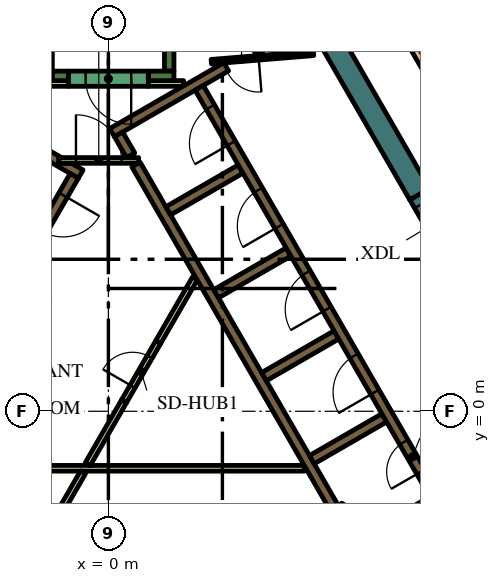
"""IFC4 building model, lengths in metres.
Left out: names, types, materials, properties, quantities, classifications, styles, units other than length and angle.
Written with IfcOpenShell. Run it as: python <this file> out.ifc"""

import sys

from ifc_helpers import new_model, si_unit, direction, frame, frame_2d, origin, place, context, subcontext, project, spatial, polyline, rectangle, outline, extrude, element, fill, save


model = new_model("IFC4")
c1 = context("Model", 3, precision=1e-05, world=origin(), true_north=direction((0.0, 1.0)))
c2 = subcontext(c1, "Body", "Model", "MODEL_VIEW")
j1 = project(units=[si_unit("LENGTHUNIT", "METRE"), si_unit("PLANEANGLEUNIT", "RADIAN")], contexts=[c1])
p1 = place(None, origin())
s1 = spatial("IfcSite", under=j1, at=p1, CompositionType="ELEMENT")
p2 = place(p1, origin())
s2 = spatial("IfcBuilding", under=s1, at=p2, CompositionType="ELEMENT")
p3 = place(p2, frame((0.0, 0.0, 331.8)))
s3 = spatial("IfcBuildingStorey", under=s2, at=p3, CompositionType="ELEMENT", Elevation=331.8)
p4 = place(p3, frame((1.989, 16.456, 0.0), z_axis=(0.0, 0.0, 1.0), x_axis=(0.49999102663, -0.8660305845, 0.0)))
e1 = element("IfcWall", 1, at=p4, inside=s3, PredefinedType="SOLIDWALL", context=c2, shape_type="SweptSolid", body=[
    extrude(rectangle(XDim=12.406, YDim=0.6, at=frame_2d((6.203, 0.0))), origin(), (0.0, 0.0, 1.0), 4.2),
])
p5 = place(p3, frame((1.6, 8.95, 0.0), z_axis=(0.0, 0.0, 1.0), x_axis=(0.0, 1.0, 0.0)))
e2 = element("IfcWall", 2, at=p5, inside=s3, PredefinedType="SOLIDWALL", context=c2, shape_type="SweptSolid", body=[
    extrude(rectangle(XDim=6.8, YDim=0.25, at=frame_2d((3.4, 0.0))), origin(), (0.0, 0.0, 1.0), 4.2),
])
p6 = place(p3, frame((1.05, 8.825, 0.0), z_axis=(0.0, 0.0, 1.0), x_axis=(1.0, 0.0, 0.0)))
e3 = element("IfcWall", 3, at=p6, inside=s3, PredefinedType="SOLIDWALL", context=c2, shape_type="SweptSolid", body=[
    extrude(rectangle(XDim=0.675, YDim=0.25, at=frame_2d((0.337, 0.0))), origin(), (0.0, 0.0, 1.0), 4.2),
])
p7 = place(p3, frame((-1.6, 8.7, 0.0), z_axis=(0.0, 0.0, 1.0), x_axis=(0.0, 1.0, 0.0)))
e4 = element("IfcWall", 4, at=p7, inside=s3, PredefinedType="SOLIDWALL", context=c2, shape_type="SweptSolid", body=[
    extrude(rectangle(XDim=7.05, YDim=0.25, at=frame_2d((3.525, 0.0))), origin(), (0.0, 0.0, 1.0), 4.2),
])
p8 = place(p3, frame((-1.475, 8.825, 0.0), z_axis=(0.0, 0.0, 1.0), x_axis=(1.0, 0.0, 0.0)))
e5 = element("IfcWall", 5, at=p8, inside=s3, PredefinedType="SOLIDWALL", context=c2, shape_type="SweptSolid", body=[
    extrude(rectangle(XDim=0.425, YDim=0.25, at=frame_2d((0.212, 0.0))), origin(), (0.0, 0.0, 1.0), 4.2),
])
p9 = place(p3, frame((8.61, -2.303, 0.0), z_axis=(0.0, 0.0, 1.0), x_axis=(-0.866056864386, -0.49994550468, 0.0)))
e6 = element("IfcWall", 6, at=p9, inside=s3, PredefinedType="SOLIDWALL", context=c2, shape_type="SweptSolid", body=[
    extrude(rectangle(XDim=2.621, YDim=0.25, at=frame_2d((1.311, 0.0))), origin(), (0.0, 0.0, 1.0), 4.2),
])
p10 = place(p3, frame((3.1, 9.064, 0.0), z_axis=(0.0, 0.0, 1.0), x_axis=(-0.866033137035, -0.499986605379, 0.0)))
e7 = element("IfcWall", 7, at=p10, inside=s3, PredefinedType="SOLIDWALL", context=c2, shape_type="SweptSolid", body=[
    extrude(rectangle(XDim=3.467, YDim=0.25, at=frame_2d((1.733, 0.0))), origin(), (0.0, 0.0, 1.0), 4.2),
])
p11 = place(p3, frame((0.268, 7.285, 0.0), z_axis=(0.0, 0.0, 1.0), x_axis=(0.500098681536, -0.865968422476, 0.0)))
e8 = element("IfcWall", 8, at=p11, inside=s3, PredefinedType="SOLIDWALL", context=c2, shape_type="SweptSolid", body=[
    extrude(rectangle(XDim=0.636, YDim=0.25, at=frame_2d((0.318, 0.0))), origin(), (0.0, 0.0, 1.0), 4.2),
])
p12 = place(p3, frame((5.97, -2.591, 0.0), z_axis=(0.0, 0.0, 1.0), x_axis=(-0.499994469932, 0.866028596547, 0.0)))
e9 = element("IfcWall", 9, at=p12, inside=s3, PredefinedType="SOLIDWALL", context=c2, shape_type="SweptSolid", body=[
    extrude(rectangle(XDim=10.488, YDim=0.25, at=frame_2d((5.244, 0.0))), origin(), (0.0, 0.0, 1.0), 4.2),
])
p13 = place(p3, frame((1.574, 5.274, 0.0), z_axis=(0.0, 0.0, 1.0), x_axis=(0.866028486751, 0.499994660107, 0.0)))
e10 = element("IfcWall", 10, at=p13, inside=s3, PredefinedType="SOLIDWALL", context=c2, shape_type="SweptSolid", body=[
    extrude(rectangle(XDim=2.2, YDim=0.25, at=frame_2d((1.1, 0.0))), origin(), (0.0, 0.0, 1.0), 4.2),
])
for number, where, z_axis, x_axis in (
    (11, (2.834, 3.091, 0.0), (0.0, 0.0, 1.0), (0.866, 0.5, 0.0)),
    (12, (4.094, 0.909, 0.0), (0.0, 0.0, 1.0), (0.866, 0.5, 0.0)),
    (13, (5.354, -1.274, 0.0), (0.0, 0.0, 1.0), (0.866, 0.5, 0.0)),
):
    element("IfcWall", number, at=place(p3, frame(where, z_axis=z_axis, x_axis=x_axis)), inside=s3, PredefinedType="SOLIDWALL", context=c2, shape_type="SweptSolid", body=[
        extrude(rectangle(XDim=2.2, YDim=0.25, at=frame_2d((1.1, 0.0))), origin(), (0.0, 0.0, 1.0), 4.2),
    ])
p14 = place(p3, frame((3.83, 9.486, 0.0), z_axis=(0.0, 0.0, 1.0), x_axis=(0.865986202621, 0.500067892261, 0.0)))
e14 = element("IfcWall", 14, at=p14, inside=s3, PredefinedType="SOLIDWALL", context=c2, shape_type="SweptSolid", body=[
    extrude(rectangle(XDim=1.591, YDim=0.25, at=frame_2d((0.795, 0.0))), origin(), (0.0, 0.0, 1.0), 4.2),
])
p15 = place(p3, origin())
e15 = element("IfcWall", 15, at=p15, inside=s3, PredefinedType="SOLIDWALL", context=c2, shape_type="SweptSolid", body=[
    extrude(outline(polyline([(-2.912, 7.356), (-2.787, 7.573), (-1.232, 6.675), (-1.303, 6.675), (-1.304, 6.675), (-1.304, 6.675), (-1.304, 6.525), (-1.304, 6.525), (-1.303, 6.525), (-0.971, 6.525), (-0.665, 6.348), (-0.79, 6.132), (-1.007, 6.257), (-1.007, 6.257), (-2.912, 7.356)])), origin(), (0.0, 0.0, 1.0), 4.2),
])
p16 = place(p3, frame((1.05, 8.625, 0.0), z_axis=(0.0, 0.0, 1.0), x_axis=(1.0, 0.0, 0.0)))
e16 = element("IfcWall", 16, at=p16, inside=s3, PredefinedType="PARTITIONING", context=c2, shape_type="SweptSolid", body=[
    extrude(rectangle(XDim=0.929, YDim=0.15, at=frame_2d((0.464, 0.0))), origin(), (0.0, 0.0, 1.0), 3.45),
])
p17 = place(p3, frame((-1.564, 8.625, 0.0), z_axis=(0.0, 0.0, 1.0), x_axis=(1.0, 0.0, 0.0)))
e17 = element("IfcWall", 17, at=p17, inside=s3, PredefinedType="PARTITIONING", context=c2, shape_type="SweptSolid", body=[
    extrude(rectangle(XDim=0.514, YDim=0.15, at=frame_2d((0.257, 0.0))), origin(), (0.0, 0.0, 1.0), 3.45),
])
p18 = place(p3, frame((-4.2, -1.5, 0.0), z_axis=(0.0, 0.0, 1.0), x_axis=(1.0, 0.0, 0.0)))
e18 = element("IfcWall", 18, at=p18, inside=s3, PredefinedType="PARTITIONING", context=c2, shape_type="SweptSolid", body=[
    extrude(rectangle(XDim=9.359, YDim=0.15, at=frame_2d((4.68, 0.0))), origin(), (0.0, 0.0, 1.0), 3.45),
])
p19 = place(p3, frame((-0.544, -1.393, 0.0), z_axis=(0.0, 0.0, 1.0), x_axis=(0.499928740635, 0.866066541489, 0.0)))
e19 = element("IfcWall", 19, at=p19, inside=s3, PredefinedType="PARTITIONING", context=c2, shape_type="SweptSolid", body=[
    extrude(rectangle(XDim=1.912, YDim=0.15, at=frame_2d((0.956, 0.0))), origin(), (0.0, 0.0, 1.0), 3.45),
])
p20 = place(p3, frame((-0.668, -1.607, 0.0), z_axis=(0.0, 0.0, 1.0), x_axis=(-0.50003736129, -0.866003832159, 0.0)))
e20 = element("IfcWall", 20, at=p20, inside=s3, PredefinedType="PARTITIONING", context=c2, shape_type="SweptSolid", body=[
    extrude(rectangle(XDim=2.438, YDim=0.15, at=frame_2d((1.219, 0.0))), origin(), (0.0, 0.0, 1.0), 3.45),
])
p21 = place(p3, frame((1.312, 1.822, 0.0), z_axis=(0.0, 0.0, 1.0), x_axis=(0.500003549559, 0.866023354436, 0.0)))
e21 = element("IfcWall", 21, at=p21, inside=s3, PredefinedType="PARTITIONING", context=c2, shape_type="SweptSolid", body=[
    extrude(rectangle(XDim=1.93, YDim=0.15, at=frame_2d((0.965, 0.0))), origin(), (0.0, 0.0, 1.0), 3.45),
])
p22 = place(p3, frame((8.565, -2.185, 0.0), z_axis=(0.0, 0.0, 1.0), x_axis=(-0.499997954832, 0.866026584559, 0.0)))
e22 = element("IfcWall", 22, at=p22, inside=s3, PredefinedType="SOLIDWALL", context=c2, shape_type="SweptSolid", body=[
    extrude(rectangle(XDim=12.35, YDim=0.25, at=frame_2d((6.175, 0.0))), origin(), (0.0, 0.0, 1.0), 4.2),
])
p23 = place(p22, frame((0.685, 0.0, 0.0)))
e23 = element("IfcOpeningElement", 23, at=p23, cuts=e22, PredefinedType="OPENING", context=c2, shape_type="SweptSolid", body=[
    extrude(rectangle(XDim=0.9, YDim=2.1, at=frame_2d((0.45, 1.05))), frame((0.0, 0.135, 0.0), z_axis=(0.0, -1.0, 0.0), x_axis=(1.0, 0.0, 0.0)), (0.0, 0.0, 1.0), 0.27),
])
p24 = place(p22, frame((3.105, 0.0, 0.0)))
e24 = element("IfcOpeningElement", 24, at=p24, cuts=e22, PredefinedType="OPENING", context=c2, shape_type="SweptSolid", body=[
    extrude(rectangle(XDim=1.1, YDim=2.1, at=frame_2d((0.55, 1.05))), frame((0.0, 0.135, 0.0), z_axis=(0.0, -1.0, 0.0), x_axis=(1.0, 0.0, 0.0)), (0.0, 0.0, 1.0), 0.27),
])
p25 = place(p22, frame((5.625, 0.0, 0.0)))
e25 = element("IfcOpeningElement", 25, at=p25, cuts=e22, PredefinedType="OPENING", context=c2, shape_type="SweptSolid", body=[
    extrude(rectangle(XDim=1.1, YDim=2.1, at=frame_2d((0.55, 1.05))), frame((0.0, 0.135, 0.0), z_axis=(0.0, -1.0, 0.0), x_axis=(1.0, 0.0, 0.0)), (0.0, 0.0, 1.0), 0.27),
])
p26 = place(p22, frame((8.145, 0.0, 0.0)))
e26 = element("IfcOpeningElement", 26, at=p26, cuts=e22, PredefinedType="OPENING", context=c2, shape_type="SweptSolid", body=[
    extrude(rectangle(XDim=1.1, YDim=2.1, at=frame_2d((0.55, 1.05))), frame((0.0, 0.135, 0.0), z_axis=(0.0, -1.0, 0.0), x_axis=(1.0, 0.0, 0.0)), (0.0, 0.0, 1.0), 0.27),
])
p27 = place(p22, frame((10.665, 0.0, 0.0)))
e27 = element("IfcOpeningElement", 27, at=p27, cuts=e22, PredefinedType="OPENING", context=c2, shape_type="SweptSolid", body=[
    extrude(rectangle(XDim=1.1, YDim=2.1, at=frame_2d((0.55, 1.05))), frame((0.0, 0.135, 0.0), z_axis=(0.0, -1.0, 0.0), x_axis=(1.0, 0.0, 0.0)), (0.0, 0.0, 1.0), 0.27),
])
p28 = place(p3, frame((-0.898, 6.194, 0.0), z_axis=(0.0, 0.0, 1.0), x_axis=(-0.499996202215, -0.866027596426, 0.0)))
e28 = element("IfcWall", 28, at=p28, inside=s3, PredefinedType="SOLIDWALL", context=c2, shape_type="SweptSolid", body=[
    extrude(rectangle(XDim=9.83, YDim=0.25, at=frame_2d((4.915, 0.0))), origin(), (0.0, 0.0, 1.0), 4.2),
])
p29 = place(p28, frame((0.585, 0.0, 0.0)))
e29 = element("IfcOpeningElement", 29, at=p29, cuts=e28, PredefinedType="OPENING", context=c2, shape_type="SweptSolid", body=[
    extrude(rectangle(XDim=1.1, YDim=2.1, at=frame_2d((0.55, 1.05))), frame((0.0, 0.135, 0.0), z_axis=(0.0, -1.0, 0.0), x_axis=(1.0, 0.0, 0.0)), (0.0, 0.0, 1.0), 0.27),
])
p30 = place(p28, frame((3.105, 0.0, 0.0)))
e30 = element("IfcOpeningElement", 30, at=p30, cuts=e28, PredefinedType="OPENING", context=c2, shape_type="SweptSolid", body=[
    extrude(rectangle(XDim=1.1, YDim=2.1, at=frame_2d((0.55, 1.05))), frame((0.0, 0.135, 0.0), z_axis=(0.0, -1.0, 0.0), x_axis=(1.0, 0.0, 0.0)), (0.0, 0.0, 1.0), 0.27),
])
p31 = place(p28, frame((5.625, 0.0, 0.0)))
e31 = element("IfcOpeningElement", 31, at=p31, cuts=e28, PredefinedType="OPENING", context=c2, shape_type="SweptSolid", body=[
    extrude(rectangle(XDim=1.1, YDim=2.1, at=frame_2d((0.55, 1.05))), frame((0.0, 0.135, 0.0), z_axis=(0.0, -1.0, 0.0), x_axis=(1.0, 0.0, 0.0)), (0.0, 0.0, 1.0), 0.27),
])
p32 = place(p28, frame((8.145, 0.0, 0.0)))
e32 = element("IfcOpeningElement", 32, at=p32, cuts=e28, PredefinedType="OPENING", context=c2, shape_type="SweptSolid", body=[
    extrude(rectangle(XDim=1.1, YDim=2.1, at=frame_2d((0.55, 1.05))), frame((0.0, 0.135, 0.0), z_axis=(0.0, -1.0, 0.0), x_axis=(1.0, 0.0, 0.0)), (0.0, 0.0, 1.0), 0.27),
])
p33 = place(p3, frame((1.05, 8.75, 0.0), z_axis=(0.0, 0.0, 1.0), x_axis=(-1.0, 0.0, 0.0)))
e33 = element("IfcWall", 33, at=p33, inside=s3, PredefinedType="SOLIDWALL", context=c2, shape_type="SweptSolid", body=[
    extrude(rectangle(XDim=2.1, YDim=0.4, at=frame_2d((1.05, 0.0))), origin(), (0.0, 0.0, 1.0), 4.2),
])
p34 = place(p33, frame((0.45, 0.0, 0.0)))
e34 = element("IfcOpeningElement", 34, at=p34, cuts=e33, PredefinedType="OPENING", context=c2, shape_type="SweptSolid", body=[
    extrude(rectangle(XDim=1.2, YDim=2.1, at=frame_2d((0.6, 1.05))), frame((0.0, 0.21, 0.0), z_axis=(0.0, -1.0, 0.0), x_axis=(1.0, 0.0, 0.0)), (0.0, 0.0, 1.0), 0.42),
])
p35 = place(p3, frame((5.398, 9.419, 0.0), z_axis=(0.0, 0.0, 1.0), x_axis=(-0.996653416376, -0.081743303248, 0.0)))
e35 = element("IfcWall", 35, at=p35, inside=s3, PredefinedType="PARTITIONING", context=c2, shape_type="SweptSolid", body=[
    extrude(rectangle(XDim=2.7, YDim=0.12, at=frame_2d((1.35, 0.0))), origin(), (0.0, 0.0, 1.0), 3.45),
])
p36 = place(p35, frame((1.45, 0.0, 0.0)))
e36 = element("IfcOpeningElement", 36, at=p36, cuts=e35, PredefinedType="OPENING", context=c2, shape_type="SweptSolid", body=[
    extrude(rectangle(XDim=0.9, YDim=2.1, at=frame_2d((0.45, 1.05))), frame((0.0, 0.07, 0.0), z_axis=(0.0, -1.0, 0.0), x_axis=(1.0, 0.0, 0.0)), (0.0, 0.0, 1.0), 0.14),
])
p37 = place(p3, frame((6.203, -2.456, 0.0), z_axis=(0.0, 0.0, 1.0), x_axis=(-0.500043961785, -0.866000020948, 0.0)))
e37 = element("IfcWall", 37, at=p37, inside=s3, PredefinedType="PARTITIONING", context=c2, shape_type="SweptSolid", body=[
    extrude(rectangle(XDim=1.95, YDim=0.15, at=frame_2d((0.975, 0.0))), origin(), (0.0, 0.0, 1.0), 4.2),
])
p38 = place(p37, frame((0.45, 0.0, 0.0)))
e38 = element("IfcOpeningElement", 38, at=p38, cuts=e37, PredefinedType="OPENING", context=c2, shape_type="SweptSolid", body=[
    extrude(rectangle(XDim=0.9, YDim=2.1, at=frame_2d((0.45, 1.05))), frame((0.0, 0.085, 0.0), z_axis=(0.0, -1.0, 0.0), x_axis=(1.0, 0.0, 0.0)), (0.0, 0.0, 1.0), 0.17),
])
p39 = place(p3, frame((-1.303, 6.6, 0.0), z_axis=(0.0, 0.0, 1.0), x_axis=(1.0, 0.0, 0.0)))
e39 = element("IfcWall", 39, at=p39, inside=s3, PredefinedType="PARTITIONING", context=c2, shape_type="SweptSolid", body=[
    extrude(rectangle(XDim=2.1, YDim=0.15, at=frame_2d((1.05, 0.0))), origin(), (0.0, 0.0, 1.0), 4.2),
])
p40 = place(p39, frame((0.45, 0.0, 0.0)))
e40 = element("IfcOpeningElement", 40, at=p40, cuts=e39, PredefinedType="OPENING", context=c2, shape_type="SweptSolid", body=[
    extrude(rectangle(XDim=1.2, YDim=2.1, at=frame_2d((0.6, 1.05))), frame((0.0, 0.085, 0.0), z_axis=(0.0, -1.0, 0.0), x_axis=(1.0, 0.0, 0.0)), (0.0, 0.0, 1.0), 0.17),
])
p41 = place(p3, frame((8.192, 5.711, 0.0), z_axis=(0.0, 0.0, 1.0), x_axis=(0.500062241894, -0.865989465428, 0.0)))
e41 = element("IfcWall", 41, at=p41, inside=s3, PredefinedType="SOLIDWALL", context=c2, shape_type="SweptSolid", body=[
    extrude(rectangle(XDim=1.7, YDim=0.6, at=frame_2d((0.85, 0.0))), origin(), (0.0, 0.0, 1.0), 4.2),
])
p42 = place(p41, frame((0.25, 0.0, 0.0)))
e42 = element("IfcOpeningElement", 42, at=p42, cuts=e41, PredefinedType="OPENING", context=c2, shape_type="SweptSolid", body=[
    extrude(rectangle(XDim=1.2, YDim=2.1, at=frame_2d((0.6, 1.05))), frame((0.0, 0.31, 0.0), z_axis=(0.0, -1.0, 0.0), x_axis=(1.0, 0.0, 0.0)), (0.0, 0.0, 1.0), 0.62),
])
p43 = place(p3, frame((0.412, 0.263, 0.0), z_axis=(0.0, 0.0, 1.0), x_axis=(0.500062916607, 0.865989075817, 0.0)))
e43 = element("IfcWall", 43, at=p43, inside=s3, PredefinedType="PARTITIONING", context=c2, shape_type="SweptSolid", body=[
    extrude(rectangle(XDim=1.8, YDim=0.15, at=frame_2d((0.9, 0.0))), origin(), (0.0, 0.0, 1.0), 3.45),
])
p44 = place(p43, frame((0.45, 0.0, 0.0)))
e44 = element("IfcOpeningElement", 44, at=p44, cuts=e43, PredefinedType="OPENING", context=c2, shape_type="SweptSolid", body=[
    extrude(rectangle(XDim=0.9, YDim=2.1, at=frame_2d((0.45, 1.05))), frame((0.0, 0.085, 0.0), z_axis=(0.0, -1.0, 0.0), x_axis=(1.0, 0.0, 0.0)), (0.0, 0.0, 1.0), 0.17),
])
p45 = place(p3, frame((12.309, 2.18, 0.0), z_axis=(0.0, 0.0, 1.0), x_axis=(-0.499966798825, 0.866044571643, 0.0)))
e45 = element("IfcWall", 45, at=p45, inside=s3, PredefinedType="PARTITIONING", context=c2, shape_type="SweptSolid", body=[
    extrude(rectangle(XDim=8.534, YDim=0.2, at=frame_2d((4.267, 0.0))), origin(), (0.0, 0.0, 1.0), 3.45),
])
p46 = place(p45, frame((3.667, 0.0, 0.0)))
e46 = element("IfcOpeningElement", 46, at=p46, cuts=e45, PredefinedType="OPENING", context=c2, shape_type="SweptSolid", body=[
    extrude(rectangle(XDim=1.2, YDim=2.1, at=frame_2d((0.6, 1.05))), frame((0.0, 0.11, 0.0), z_axis=(0.0, -1.0, 0.0), x_axis=(1.0, 0.0, 0.0)), (0.0, 0.0, 1.0), 0.22),
])
p47 = place(p3, frame((18.181, -1.79, 0.0), z_axis=(0.0, 0.0, 1.0), x_axis=(-0.500002158106, 0.866024157798, 0.0)))
e47 = element("IfcWall", 47, at=p47, inside=s3, PredefinedType="SOLIDWALL", context=c2, shape_type="SweptSolid", body=[
    extrude(rectangle(XDim=21.282, YDim=0.3, at=frame_2d((10.641, 0.0))), origin(), (0.0, 0.0, 1.0), 3.45),
])
p48 = place(p23, origin())
e48 = element("IfcDoor", 48, at=p48, inside=s3, OperationType="SINGLE_SWING_LEFT", PredefinedType="DOOR", context=c2, shape_type="SweptSolid", body=[
    extrude(rectangle(XDim=0.9, YDim=2.1, at=frame_2d((0.45, 1.05))), frame((0.0, 0.025, 0.0), z_axis=(0.0, -1.0, 0.0), x_axis=(1.0, 0.0, 0.0)), (0.0, 0.0, 1.0), 0.05),
])
fill(e23, e48)
p49 = place(p24, origin())
e49 = element("IfcDoor", 49, at=p49, inside=s3, OperationType="DOUBLE_DOOR_SLIDING", PredefinedType="DOOR", context=c2, shape_type="SweptSolid", body=[
    extrude(rectangle(XDim=1.1, YDim=2.1, at=frame_2d((0.55, 1.05))), frame((0.0, 0.025, 0.0), z_axis=(0.0, -1.0, 0.0), x_axis=(1.0, 0.0, 0.0)), (0.0, 0.0, 1.0), 0.05),
])
fill(e24, e49)
p50 = place(p25, origin())
e50 = element("IfcDoor", 50, at=p50, inside=s3, OperationType="DOUBLE_DOOR_SLIDING", PredefinedType="DOOR", context=c2, shape_type="SweptSolid", body=[
    extrude(rectangle(XDim=1.1, YDim=2.1, at=frame_2d((0.55, 1.05))), frame((0.0, 0.025, 0.0), z_axis=(0.0, -1.0, 0.0), x_axis=(1.0, 0.0, 0.0)), (0.0, 0.0, 1.0), 0.05),
])
fill(e25, e50)
p51 = place(p26, origin())
e51 = element("IfcDoor", 51, at=p51, inside=s3, OperationType="DOUBLE_DOOR_SLIDING", PredefinedType="DOOR", context=c2, shape_type="SweptSolid", body=[
    extrude(rectangle(XDim=1.1, YDim=2.1, at=frame_2d((0.55, 1.05))), frame((0.0, 0.025, 0.0), z_axis=(0.0, -1.0, 0.0), x_axis=(1.0, 0.0, 0.0)), (0.0, 0.0, 1.0), 0.05),
])
fill(e26, e51)
p52 = place(p27, origin())
e52 = element("IfcDoor", 52, at=p52, inside=s3, OperationType="DOUBLE_DOOR_SLIDING", PredefinedType="DOOR", context=c2, shape_type="SweptSolid", body=[
    extrude(rectangle(XDim=1.1, YDim=2.1, at=frame_2d((0.55, 1.05))), frame((0.0, 0.025, 0.0), z_axis=(0.0, -1.0, 0.0), x_axis=(1.0, 0.0, 0.0)), (0.0, 0.0, 1.0), 0.05),
])
fill(e27, e52)
p53 = place(p29, origin())
e53 = element("IfcDoor", 53, at=p53, inside=s3, OperationType="DOUBLE_DOOR_SLIDING", PredefinedType="DOOR", context=c2, shape_type="SweptSolid", body=[
    extrude(rectangle(XDim=1.1, YDim=2.1, at=frame_2d((0.55, 1.05))), frame((0.0, 0.025, 0.0), z_axis=(0.0, -1.0, 0.0), x_axis=(1.0, 0.0, 0.0)), (0.0, 0.0, 1.0), 0.05),
])
fill(e29, e53)
p54 = place(p34, origin())
e54 = element("IfcDoor", 54, at=p54, inside=s3, OperationType="SINGLE_SWING_LEFT", PredefinedType="DOOR", context=c2, shape_type="SweptSolid", body=[
    extrude(rectangle(XDim=1.2, YDim=2.1, at=frame_2d((0.6, 1.05))), frame((0.0, 0.025, 0.0), z_axis=(0.0, -1.0, 0.0), x_axis=(1.0, 0.0, 0.0)), (0.0, 0.0, 1.0), 0.05),
])
fill(e34, e54)
p55 = place(p36, origin())
e55 = element("IfcDoor", 55, at=p55, inside=s3, OperationType="SINGLE_SWING_LEFT", PredefinedType="DOOR", context=c2, shape_type="SweptSolid", body=[
    extrude(rectangle(XDim=0.9, YDim=2.1, at=frame_2d((0.45, 1.05))), frame((0.0, 0.025, 0.0), z_axis=(0.0, -1.0, 0.0), x_axis=(1.0, 0.0, 0.0)), (0.0, 0.0, 1.0), 0.05),
])
fill(e36, e55)
p56 = place(p40, origin())
e56 = element("IfcDoor", 56, at=p56, inside=s3, OperationType="SINGLE_SWING_LEFT", PredefinedType="DOOR", context=c2, shape_type="SweptSolid", body=[
    extrude(rectangle(XDim=1.2, YDim=2.1, at=frame_2d((0.6, 1.05))), frame((0.0, 0.025, 0.0), z_axis=(0.0, -1.0, 0.0), x_axis=(1.0, 0.0, 0.0)), (0.0, 0.0, 1.0), 0.05),
])
fill(e40, e56)
p57 = place(p44, origin())
e57 = element("IfcDoor", 57, at=p57, inside=s3, OperationType="SINGLE_SWING_LEFT", PredefinedType="DOOR", context=c2, shape_type="SweptSolid", body=[
    extrude(rectangle(XDim=0.9, YDim=2.1, at=frame_2d((0.45, 1.05))), frame((0.0, 0.025, 0.0), z_axis=(0.0, -1.0, 0.0), x_axis=(1.0, 0.0, 0.0)), (0.0, 0.0, 1.0), 0.05),
])
fill(e44, e57)
save(model, sys.argv[1])
